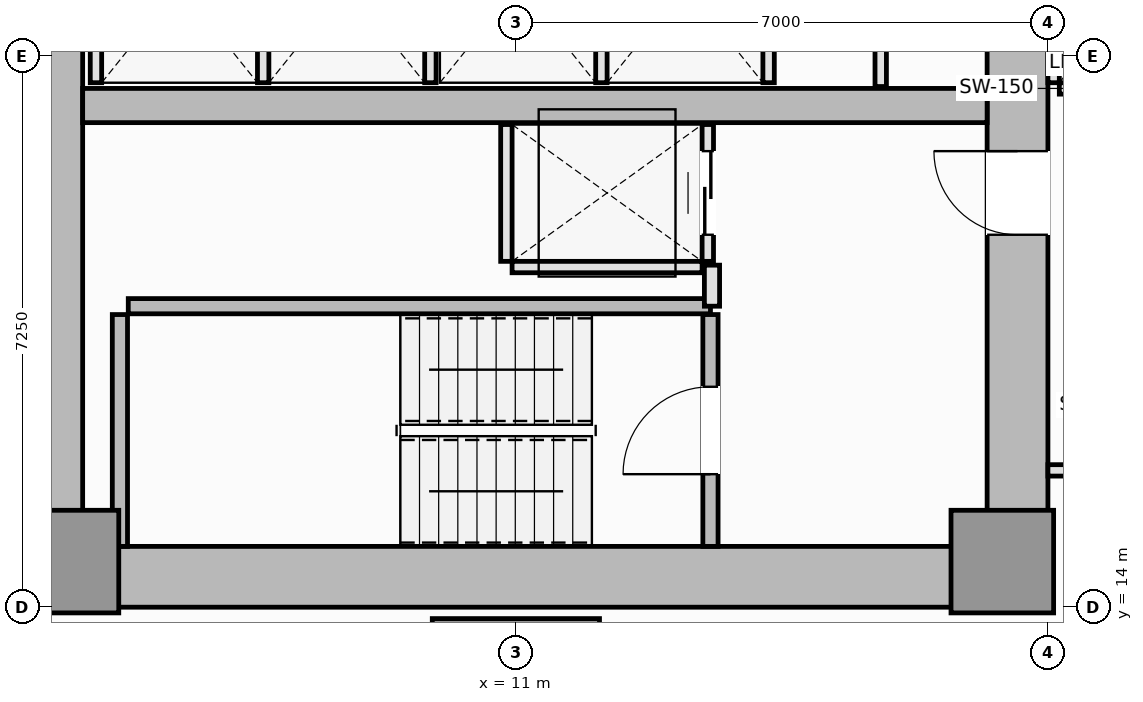
"""IFC4 building model, lengths in metres.
Left out: names, types, materials, properties, quantities, classifications, styles, units other than length and angle.
Written with IfcOpenShell. Run it as: python <this file> out.ifc"""

import sys

from ifc_helpers import new_model, si_unit, direction, frame, frame_2d, origin, origin_2d, place, context, subcontext, project, spatial, rectangle, extrude, element, fill, save


model = new_model("IFC4")
c1 = context("Model", 3, precision=1e-05, world=origin(), true_north=direction((0.0, 1.0)))
c2 = subcontext(c1, "Body", "Model", "MODEL_VIEW")
j1 = project(units=[si_unit("LENGTHUNIT", "METRE"), si_unit("PLANEANGLEUNIT", "RADIAN")], contexts=[c1])
p1 = place(None, origin())
s1 = spatial("IfcSite", under=j1, at=p1, CompositionType="ELEMENT")
p2 = place(p1, origin())
s2 = spatial("IfcBuilding", under=s1, at=p2, CompositionType="ELEMENT")
p3 = place(p2, frame((0.0, 0.0, 68.2)))
s3 = spatial("IfcBuildingStorey", under=s2, at=p3, CompositionType="ELEMENT", Elevation=68.2)
p4 = place(p3, frame((4.5, 14.4, 0.0), z_axis=(0.0, 0.0, 1.0), x_axis=(1.0, 0.0, 0.0)))
e1 = element("IfcWall", 1, at=p4, inside=s3, PredefinedType="SHEAR", context=c2, shape_type="SweptSolid", body=[
    extrude(rectangle(XDim=13.5, YDim=0.8, at=frame_2d((6.75, 0.0))), origin(), (0.0, 0.0, 1.0), 3.55),
])
p5 = place(p3, frame((4.9, 14.8, 0.0), z_axis=(0.0, 0.0, 1.0), x_axis=(0.0, 1.0, 0.0)))
e2 = element("IfcWall", 2, at=p5, inside=s3, PredefinedType="SHEAR", context=c2, shape_type="SweptSolid", body=[
    extrude(rectangle(XDim=20.9, YDim=0.8, at=frame_2d((10.45, 0.0))), origin(), (0.0, 0.0, 1.0), 3.55),
])
p6 = place(p3, frame((17.6, 14.8, 0.0), z_axis=(0.0, 0.0, 1.0), x_axis=(0.0, 1.0, 0.0)))
e3 = element("IfcWall", 3, at=p6, inside=s3, PredefinedType="SHEAR", context=c2, shape_type="SweptSolid", body=[
    extrude(rectangle(XDim=8.65, YDim=0.8, at=frame_2d((4.325, 0.0))), origin(), (0.0, 0.0, 1.0), 3.55),
])
p7 = place(p6, frame((4.1, 0.0, 0.0)))
e4 = element("IfcOpeningElement", 4, at=p7, cuts=e3, PredefinedType="OPENING", context=c2, shape_type="SweptSolid", body=[
    extrude(rectangle(XDim=1.1, YDim=2.15, at=frame_2d((0.55, 1.075))), frame((0.0, 0.41, 0.0), z_axis=(0.0, -1.0, 0.0), x_axis=(1.0, 0.0, 0.0)), (0.0, 0.0, 1.0), 0.82),
])
p8 = place(p3, frame((5.3, 20.6, 0.0), z_axis=(0.0, 0.0, 1.0), x_axis=(1.0, 0.0, 0.0)))
e5 = element("IfcWall", 5, at=p8, inside=s3, PredefinedType="SHEAR", context=c2, shape_type="SweptSolid", body=[
    extrude(rectangle(XDim=11.9, YDim=0.45, at=frame_2d((5.95, 0.0))), origin(), (0.0, 0.0, 1.0), 3.55),
])
for number, where, z_axis, x_axis in (
    (6, (5.1, 14.6, 0.0), (0.0, 0.0, 1.0), (1.0, 0.0, 0.0)),
    (7, (17.4, 14.6, 0.0), (0.0, 0.0, 1.0), (1.0, 0.0, 0.0)),
):
    element("IfcColumn", number, at=place(p3, frame(where, z_axis=z_axis, x_axis=x_axis)), inside=s3, PredefinedType="PILASTER", context=c2, shape_type="SweptSolid", body=[
        extrude(rectangle(XDim=1.35, YDim=1.35, at=origin_2d()), origin(), (0.0, 0.0, 1.0), 3.55),
    ])
p9 = place(p3, frame((11.0, 12.75, 0.0), z_axis=(0.0, 0.0, 1.0), x_axis=(1.0, 0.0, 0.0)))
e8 = element("IfcColumn", 8, at=p9, inside=s3, PredefinedType="COLUMN", context=c2, shape_type="SweptSolid", body=[
    extrude(rectangle(XDim=2.2, YDim=2.2, at=origin_2d()), origin(), (0.0, 0.0, 1.0), 3.55),
])
p10 = place(p3, frame((5.79, 14.8, 0.0), z_axis=(0.0, 0.0, 1.0), x_axis=(0.0, 1.0, 0.0)))
e9 = element("IfcWall", 9, at=p10, inside=s3, PredefinedType="SOLIDWALL", context=c2, shape_type="SweptSolid", body=[
    extrude(rectangle(XDim=3.05, YDim=0.2, at=frame_2d((1.525, 0.0))), origin(), (0.0, 0.0, 1.0), 3.55),
])
p11 = place(p3, frame((5.9, 17.96, 0.0), z_axis=(0.0, 0.0, 1.0), x_axis=(1.0, 0.0, 0.0)))
e10 = element("IfcWall", 10, at=p11, inside=s3, PredefinedType="SOLIDWALL", context=c2, shape_type="SweptSolid", body=[
    extrude(rectangle(XDim=7.66, YDim=0.2, at=frame_2d((3.83, 0.0))), origin(), (0.0, 0.0, 1.0), 3.55),
])
p12 = place(p3, frame((13.56, 14.8, 0.0), z_axis=(0.0, 0.0, 1.0), x_axis=(0.0, 1.0, 0.0)))
e11 = element("IfcWall", 11, at=p12, inside=s3, PredefinedType="SOLIDWALL", context=c2, shape_type="SweptSolid", body=[
    extrude(rectangle(XDim=3.05, YDim=0.2, at=frame_2d((1.525, 0.0))), origin(), (0.0, 0.0, 1.0), 3.55),
])
p13 = place(p12, frame((0.95, 0.0, 0.0)))
e12 = element("IfcOpeningElement", 12, at=p13, cuts=e11, PredefinedType="OPENING", context=c2, shape_type="SweptSolid", body=[
    extrude(rectangle(XDim=1.15, YDim=2.15, at=frame_2d((0.575, 1.075))), frame((0.0, 0.11, 0.0), z_axis=(0.0, -1.0, 0.0), x_axis=(1.0, 0.0, 0.0)), (0.0, 0.0, 1.0), 0.22),
])
p14 = place(p3, frame((18.15, 20.825, 0.0), z_axis=(0.0, 0.0, 1.0), x_axis=(1.0, 0.0, 0.0)))
e13 = element("IfcWall", 13, at=p14, inside=s3, PredefinedType="PARTITIONING", context=c2, shape_type="SweptSolid", body=[
    extrude(rectangle(XDim=2.05, YDim=0.15, at=frame_2d((1.025, 0.0))), origin(), (0.0, 0.0, 1.0), 3.37),
])
for number, where, z_axis, x_axis in (
    (14, (18.075, 20.9, 0.0), (0.0, 0.0, 1.0), (0.0, 1.0, 0.0)),
    (15, (5.475, 20.9, 0.0), (0.0, 0.0, 1.0), (0.0, 1.0, 0.0)),
    (16, (7.675, 20.9, 0.0), (0.0, 0.0, 1.0), (0.0, 1.0, 0.0)),
    (17, (9.875, 20.9, 0.0), (0.0, 0.0, 1.0), (0.0, 1.0, 0.0)),
    (18, (12.125, 20.9, 0.0), (0.0, 0.0, 1.0), (0.0, 1.0, 0.0)),
    (19, (14.325, 20.9, 0.0), (0.0, 0.0, 1.0), (0.0, 1.0, 0.0)),
):
    element("IfcWall", number, at=place(p3, frame(where, z_axis=z_axis, x_axis=x_axis)), inside=s3, PredefinedType="PARTITIONING", context=c2, shape_type="SweptSolid", body=[
        extrude(rectangle(XDim=2.55, YDim=0.15, at=frame_2d((1.275, 0.0))), origin(), (0.0, 0.0, 1.0), 3.37),
    ])
p15 = place(p3, frame((10.95, 18.475, 0.0), z_axis=(0.0, 0.0, 1.0), x_axis=(1.0, 0.0, 0.0)))
e20 = element("IfcWall", 20, at=p15, inside=s3, PredefinedType="PARTITIONING", context=c2, shape_type="SweptSolid", body=[
    extrude(rectangle(XDim=2.5, YDim=0.15, at=frame_2d((1.25, 0.0))), origin(), (0.0, 0.0, 1.0), 3.37),
])
p16 = place(p3, frame((10.875, 18.55, 0.0), z_axis=(0.0, 0.0, 1.0), x_axis=(0.0, 1.0, 0.0)))
e21 = element("IfcWall", 21, at=p16, inside=s3, PredefinedType="PARTITIONING", context=c2, shape_type="SweptSolid", body=[
    extrude(rectangle(XDim=1.8, YDim=0.15, at=frame_2d((0.9, 0.0))), origin(), (0.0, 0.0, 1.0), 3.37),
])
p17 = place(p3, frame((13.525, 18.55, 0.0), z_axis=(0.0, 0.0, 1.0), x_axis=(0.0, 1.0, 0.0)))
e22 = element("IfcWall", 22, at=p17, inside=s3, PredefinedType="PARTITIONING", context=c2, shape_type="SweptSolid", body=[
    extrude(rectangle(XDim=1.8, YDim=0.15, at=frame_2d((0.9, 0.0))), origin(), (0.0, 0.0, 1.0), 3.37),
])
p18 = place(p17, frame((0.35, 0.0, 0.0)))
e23 = element("IfcOpeningElement", 23, at=p18, cuts=e22, PredefinedType="OPENING", context=c2, shape_type="SweptSolid", body=[
    extrude(rectangle(XDim=1.1, YDim=2.2, at=frame_2d((0.55, 1.1))), frame((0.0, 0.085, 0.0), z_axis=(0.0, -1.0, 0.0), x_axis=(1.0, 0.0, 0.0)), (0.0, 0.0, 1.0), 0.17),
])
p19 = place(p3, frame((13.58, 17.96, 0.0), z_axis=(0.0, 0.0, 1.0), x_axis=(0.0, 1.0, 0.0)))
e24 = element("IfcWall", 24, at=p19, inside=s3, PredefinedType="PARTITIONING", context=c2, shape_type="SweptSolid", body=[
    extrude(rectangle(XDim=0.54, YDim=0.2, at=frame_2d((0.27, 0.0))), origin(), (0.0, 0.0, 1.0), 3.37),
])
p20 = place(p3, frame((15.8, 20.85, 0.0), z_axis=(0.0, 0.0, 1.0), x_axis=(0.0, 1.0, 0.0)))
e25 = element("IfcWall", 25, at=p20, inside=s3, PredefinedType="PARTITIONING", context=c2, shape_type="SweptSolid", body=[
    extrude(rectangle(XDim=2.67, YDim=0.15, at=frame_2d((1.335, 0.0))), origin(), (0.0, 0.0, 1.0), 3.37),
])
p21 = place(p3, frame((18.0, 15.8, 0.0), z_axis=(0.0, 0.0, 1.0), x_axis=(1.0, 0.0, 0.0)))
e26 = element("IfcWall", 26, at=p21, inside=s3, PredefinedType="PARTITIONING", context=c2, shape_type="SweptSolid", body=[
    extrude(rectangle(XDim=9.5, YDim=0.15, at=frame_2d((4.75, 0.0))), origin(), (0.0, 0.0, 1.0), 3.37),
])
p22 = place(p21, frame((4.25, 0.0, 0.0)))
e27 = element("IfcOpeningElement", 27, at=p22, cuts=e26, PredefinedType="OPENING", context=c2, shape_type="SweptSolid", body=[
    extrude(rectangle(XDim=1.0, YDim=2.15, at=frame_2d((0.5, 1.075))), frame((0.0, 0.085, 0.0), z_axis=(0.0, -1.0, 0.0), x_axis=(1.0, 0.0, 0.0)), (0.0, 0.0, 1.0), 0.17),
])
p23 = place(p13, origin())
e28 = element("IfcDoor", 28, at=p23, inside=s3, OperationType="SINGLE_SWING_LEFT", PredefinedType="DOOR", context=c2, shape_type="SweptSolid", body=[
    extrude(rectangle(XDim=1.15, YDim=2.15, at=frame_2d((0.575, 1.075))), frame((0.0, 0.025, 0.0), z_axis=(0.0, -1.0, 0.0), x_axis=(1.0, 0.0, 0.0)), (0.0, 0.0, 1.0), 0.05),
])
fill(e12, e28)
p24 = place(p18, origin())
e29 = element("IfcDoor", 29, at=p24, inside=s3, OperationType="DOUBLE_DOOR_SLIDING", PredefinedType="DOOR", context=c2, shape_type="SweptSolid", body=[
    extrude(rectangle(XDim=1.1, YDim=2.2, at=frame_2d((0.55, 1.1))), frame((0.0, 0.025, 0.0), z_axis=(0.0, -1.0, 0.0), x_axis=(1.0, 0.0, 0.0)), (0.0, 0.0, 1.0), 0.05),
])
fill(e23, e29)
p25 = place(p7, origin())
e30 = element("IfcDoor", 30, at=p25, inside=s3, OperationType="SINGLE_SWING_RIGHT", PredefinedType="DOOR", context=c2, shape_type="SweptSolid", body=[
    extrude(rectangle(XDim=1.1, YDim=2.15, at=frame_2d((0.55, 1.075))), frame((0.0, 0.025, 0.0), z_axis=(0.0, -1.0, 0.0), x_axis=(1.0, 0.0, 0.0)), (0.0, 0.0, 1.0), 0.05),
])
fill(e4, e30)
save(model, sys.argv[1])
